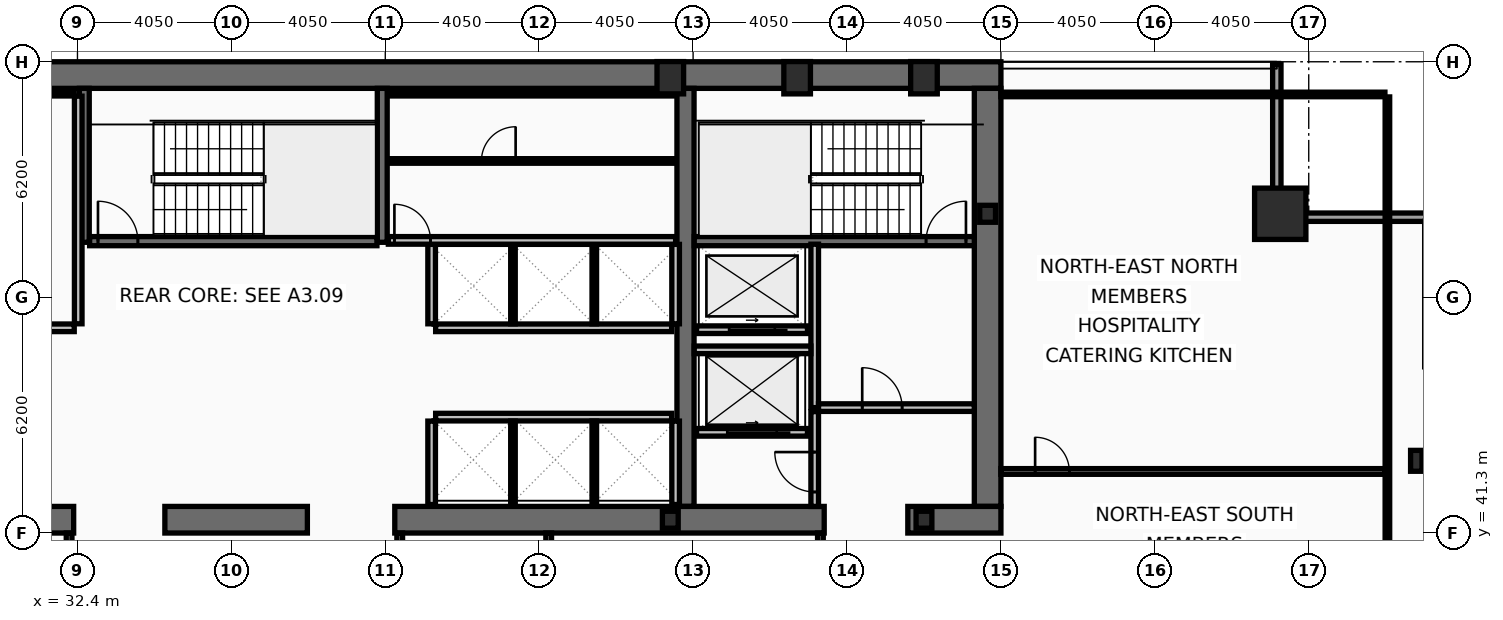
"""IFC4 building model, lengths in metres.
Left out: names, types, materials, properties, quantities, classifications, styles, units other than length and angle.
Written with IfcOpenShell. Run it as: python <this file> out.ifc"""

import sys

from ifc_helpers import new_model, si_unit, direction, frame, frame_2d, origin, origin_2d, place, context, subcontext, project, spatial, rectangle, hollow_rectangle, i_section, extrude, element, fill, save


model = new_model("IFC4")
c1 = context("Model", 3, precision=1e-05, world=origin(), true_north=direction((0.0, 1.0)))
c2 = subcontext(c1, "Body", "Model", "MODEL_VIEW")
j1 = project(units=[si_unit("LENGTHUNIT", "METRE"), si_unit("PLANEANGLEUNIT", "RADIAN")], contexts=[c1])
p1 = place(None, origin())
s1 = spatial("IfcSite", under=j1, at=p1, CompositionType="ELEMENT")
p2 = place(p1, origin())
s2 = spatial("IfcBuilding", under=s1, at=p2, CompositionType="ELEMENT")
p3 = place(p2, frame((0.0, 0.0, 150.6)))
s3 = spatial("IfcBuildingStorey", under=s2, at=p3, CompositionType="ELEMENT", Elevation=150.6)
p4 = place(p3, frame((16.2, 53.35, 0.0), z_axis=(0.0, 0.0, 1.0), x_axis=(1.0, 0.0, 0.0)))
e1 = element("IfcWall", 1, at=p4, inside=s3, PredefinedType="SHEAR", context=c2, shape_type="SweptSolid", body=[
    extrude(rectangle(XDim=40.5, YDim=0.7, at=frame_2d((20.25, 0.0))), origin(), (0.0, 0.0, 1.0), 3.44),
])
p5 = place(p3, frame((56.35, 53.0, 0.0), z_axis=(0.0, 0.0, 1.0), x_axis=(0.0, -1.0, 0.0)))
e2 = element("IfcWall", 2, at=p5, inside=s3, PredefinedType="SHEAR", context=c2, shape_type="SweptSolid", body=[
    extrude(rectangle(XDim=11.0, YDim=0.7, at=frame_2d((5.5, 0.0))), origin(), (0.0, 0.0, 1.0), 3.44),
])
p6 = place(p3, frame((48.4, 42.0, 0.0), z_axis=(0.0, 0.0, 1.0), x_axis=(0.0, 1.0, 0.0)))
e3 = element("IfcWall", 3, at=p6, inside=s3, PredefinedType="SHEAR", context=c2, shape_type="SweptSolid", body=[
    extrude(rectangle(XDim=11.0, YDim=0.45, at=frame_2d((5.5, 0.0))), origin(), (0.0, 0.0, 1.0), 3.44),
])
p7 = place(p3, frame((32.3, 41.65, 0.0), z_axis=(0.0, 0.0, 1.0), x_axis=(-1.0, 0.0, 0.0)))
e4 = element("IfcWall", 4, at=p7, inside=s3, PredefinedType="SHEAR", context=c2, shape_type="SweptSolid", body=[
    extrude(rectangle(XDim=11.45, YDim=0.7, at=frame_2d((5.725, 0.0))), origin(), (0.0, 0.0, 1.0), 3.44),
])
p8 = place(p3, frame((38.45, 41.65, 0.0), z_axis=(0.0, 0.0, 1.0), x_axis=(-1.0, 0.0, 0.0)))
e5 = element("IfcWall", 5, at=p8, inside=s3, PredefinedType="SHEAR", context=c2, shape_type="SweptSolid", body=[
    extrude(rectangle(XDim=3.75, YDim=0.7, at=frame_2d((1.875, 0.0))), origin(), (0.0, 0.0, 1.0), 3.44),
])
p9 = place(p3, frame((52.05, 41.65, 0.0), z_axis=(0.0, 0.0, 1.0), x_axis=(-1.0, 0.0, 0.0)))
e6 = element("IfcWall", 6, at=p9, inside=s3, PredefinedType="SHEAR", context=c2, shape_type="SweptSolid", body=[
    extrude(rectangle(XDim=11.3, YDim=0.7, at=frame_2d((5.65, 0.0))), origin(), (0.0, 0.0, 1.0), 3.44),
])
p10 = place(p3, frame((56.7, 41.65, 0.0), z_axis=(0.0, 0.0, 1.0), x_axis=(-1.0, 0.0, 0.0)))
e7 = element("IfcWall", 7, at=p10, inside=s3, PredefinedType="SHEAR", context=c2, shape_type="SweptSolid", body=[
    extrude(rectangle(XDim=2.45, YDim=0.7, at=frame_2d((1.225, 0.0))), origin(), (0.0, 0.0, 1.0), 3.44),
])
for number, where, z_axis, x_axis in (
    (8, (32.58, 48.95, 0.0), (0.0, 0.0, 1.0), (0.0, 1.0, 0.0)),
    (9, (40.42, 48.95, 0.0), (0.0, 0.0, 1.0), (0.0, 1.0, 0.0)),
):
    element("IfcWall", number, at=place(p3, frame(where, z_axis=z_axis, x_axis=x_axis)), inside=s3, PredefinedType="SHEAR", context=c2, shape_type="SweptSolid", body=[
        extrude(rectangle(XDim=4.05, YDim=0.26, at=frame_2d((2.025, 0.0))), origin(), (0.0, 0.0, 1.0), 3.44),
    ])
p11 = place(p3, frame((48.63, 48.98, 0.0), z_axis=(0.0, 0.0, 1.0), x_axis=(1.0, 0.0, 0.0)))
e10 = element("IfcWall", 10, at=p11, inside=s3, PredefinedType="SHEAR", context=c2, shape_type="SweptSolid", body=[
    extrude(rectangle(XDim=7.37, YDim=0.24, at=frame_2d((3.685, 0.0))), origin(), (0.0, 0.0, 1.0), 3.44),
])
p12 = place(p11, frame((6.1, 0.0, 0.0)))
e11 = element("IfcOpeningElement", 11, at=p12, cuts=e10, PredefinedType="OPENING", context=c2, shape_type="SweptSolid", body=[
    extrude(rectangle(XDim=1.05, YDim=2.15, at=frame_2d((0.525, 1.075))), frame((0.0, 0.13, 0.0), z_axis=(0.0, -1.0, 0.0), x_axis=(1.0, 0.0, 0.0)), (0.0, 0.0, 1.0), 0.26),
])
p13 = place(p3, frame((32.72, 48.98, 0.0), z_axis=(0.0, 0.0, 1.0), x_axis=(1.0, 0.0, 0.0)))
e12 = element("IfcWall", 12, at=p13, inside=s3, PredefinedType="SHEAR", context=c2, shape_type="SweptSolid", body=[
    extrude(rectangle(XDim=7.56, YDim=0.24, at=frame_2d((3.78, 0.0))), origin(), (0.0, 0.0, 1.0), 3.44),
])
p14 = place(p13, frame((0.22, 0.0, 0.0)))
e13 = element("IfcOpeningElement", 13, at=p14, cuts=e12, PredefinedType="OPENING", context=c2, shape_type="SweptSolid", body=[
    extrude(rectangle(XDim=1.05, YDim=2.15, at=frame_2d((0.525, 1.075))), frame((0.0, 0.13, 0.0), z_axis=(0.0, -1.0, 0.0), x_axis=(1.0, 0.0, 0.0)), (0.0, 0.0, 1.0), 0.26),
])
p15 = place(p3, frame((64.05, 49.7, 0.0), z_axis=(0.0, 0.0, 1.0), x_axis=(1.0, 0.0, 0.0)))
e14 = element("IfcColumn", 14, at=p15, inside=s3, PredefinedType="COLUMN", context=c2, shape_type="SweptSolid", body=[
    extrude(hollow_rectangle(XDim=1.35, YDim=1.35, WallThickness=0.065, at=origin_2d()), origin(), (0.0, 0.0, 1.0), 3.6),
])
for number, where, z_axis, x_axis in (
    (15, (48.0, 53.28, 0.0), (0.0, 0.0, 1.0), (1.0, 0.0, 0.0)),
    (16, (51.337, 53.28, 0.0), (0.0, 0.0, 1.0), (1.0, 0.0, 0.0)),
    (17, (54.675, 53.28, 0.0), (0.0, 0.0, 1.0), (1.0, 0.0, 0.0)),
):
    element("IfcColumn", number, at=place(p3, frame(where, z_axis=z_axis, x_axis=x_axis)), inside=s3, PredefinedType="COLUMN", context=c2, shape_type="SweptSolid", body=[
        extrude(hollow_rectangle(XDim=0.7, YDim=0.85, WallThickness=0.05, at=origin_2d()), origin(), (0.0, 0.0, 1.0), 3.6),
    ])
p16 = place(p3, frame((67.63, 43.2, 0.0), z_axis=(0.0, 0.0, 1.0), x_axis=(1.0, 0.0, 0.0)))
e18 = element("IfcColumn", 18, at=p16, inside=s3, PredefinedType="COLUMN", context=c2, shape_type="SweptSolid", body=[
    extrude(i_section(OverallWidth=0.3, OverallDepth=0.55, WebThickness=0.015, FlangeThickness=0.029, at=origin_2d()), origin(), (0.0, 0.0, 1.0), 3.6),
])
for number, where, z_axis, x_axis in (
    (19, (56.35, 49.7, 0.0), (0.0, 0.0, 1.0), (1.0, 0.0, 0.0)),
    (20, (48.0, 41.65, 0.0), (0.0, 0.0, 1.0), (1.0, 0.0, 0.0)),
    (21, (54.675, 41.65, 0.0), (0.0, 0.0, 1.0), (1.0, 0.0, 0.0)),
):
    element("IfcColumn", number, at=place(p3, frame(where, z_axis=z_axis, x_axis=x_axis)), inside=s3, PredefinedType="COLUMN", context=c2, shape_type="SweptSolid", body=[
        extrude(i_section(OverallWidth=0.416, OverallDepth=0.446, WebThickness=0.039, FlangeThickness=0.063, at=origin_2d()), origin(), (0.0, 0.0, 1.0), 3.6),
    ])
p17 = place(p3, frame((63.96, 53.63, 0.0), z_axis=(0.0, 0.0, 1.0), x_axis=(0.0, -1.0, 0.0)))
e22 = element("IfcWall", 22, at=p17, inside=s3, PredefinedType="SOLIDWALL", context=c2, shape_type="SweptSolid", body=[
    extrude(rectangle(XDim=3.91, YDim=0.22, at=frame_2d((1.955, 0.0))), origin(), (0.0, 0.0, 1.0), 2.83),
])
p18 = place(p3, frame((63.85, 49.61, 0.0), z_axis=(0.0, 0.0, 1.0), x_axis=(1.0, 0.0, 0.0)))
e23 = element("IfcWall", 23, at=p18, inside=s3, PredefinedType="SOLIDWALL", context=c2, shape_type="SweptSolid", body=[
    extrude(rectangle(XDim=4.22, YDim=0.22, at=frame_2d((2.11, 0.0))), origin(), (0.0, 0.0, 1.0), 2.83),
])
p19 = place(p3, frame((51.61, 43.95, 0.0), z_axis=(0.0, 0.0, 1.0), x_axis=(-1.0, 0.0, 0.0)))
e24 = element("IfcWall", 24, at=p19, inside=s3, PredefinedType="PARTITIONING", context=c2, shape_type="SweptSolid", body=[
    extrude(rectangle(XDim=2.92, YDim=0.2, at=frame_2d((1.46, 0.0))), origin(), (0.0, 0.0, 1.0), 3.44),
])
p20 = place(p19, frame((0.81, 0.0, 0.0)))
e25 = element("IfcOpeningElement", 25, at=p20, cuts=e24, PredefinedType="OPENING", context=c2, shape_type="SweptSolid", body=[
    extrude(rectangle(XDim=1.3, YDim=2.18, at=frame_2d((0.65, 1.09))), frame((0.0, 0.11, 0.0), z_axis=(0.0, -1.0, 0.0), x_axis=(1.0, 0.0, 0.0)), (0.0, 0.0, 1.0), 0.22),
])
p21 = place(p3, frame((51.61, 46.65, 0.0), z_axis=(0.0, 0.0, 1.0), x_axis=(-1.0, 0.0, 0.0)))
e26 = element("IfcWall", 26, at=p21, inside=s3, PredefinedType="PARTITIONING", context=c2, shape_type="SweptSolid", body=[
    extrude(rectangle(XDim=2.92, YDim=0.2, at=frame_2d((1.46, 0.0))), origin(), (0.0, 0.0, 1.0), 3.44),
])
p22 = place(p21, frame((0.86, 0.0, 0.0)))
e27 = element("IfcOpeningElement", 27, at=p22, cuts=e26, PredefinedType="OPENING", context=c2, shape_type="SweptSolid", body=[
    extrude(rectangle(XDim=1.2, YDim=2.18, at=frame_2d((0.6, 1.09))), frame((0.0, 0.11, 0.0), z_axis=(0.0, -1.0, 0.0), x_axis=(1.0, 0.0, 0.0)), (0.0, 0.0, 1.0), 0.22),
])
p23 = place(p3, frame((51.8, 44.6, 0.0), z_axis=(0.0, 0.0, 1.0), x_axis=(0.0, 1.0, 0.0)))
e28 = element("IfcWall", 28, at=p23, inside=s3, PredefinedType="PARTITIONING", context=c2, shape_type="SweptSolid", body=[
    extrude(rectangle(XDim=4.3, YDim=0.2, at=frame_2d((2.15, 0.0))), origin(), (0.0, 0.0, 1.0), 3.44),
])
p24 = place(p3, frame((51.9, 44.6, 0.0), z_axis=(0.0, 0.0, 1.0), x_axis=(1.0, 0.0, 0.0)))
e29 = element("IfcWall", 29, at=p24, inside=s3, PredefinedType="PARTITIONING", context=c2, shape_type="SweptSolid", body=[
    extrude(rectangle(XDim=4.1, YDim=0.2, at=frame_2d((2.05, 0.0))), origin(), (0.0, 0.0, 1.0), 3.44),
])
p25 = place(p24, frame((1.15, 0.0, 0.0)))
e30 = element("IfcOpeningElement", 30, at=p25, cuts=e29, PredefinedType="OPENING", context=c2, shape_type="SweptSolid", body=[
    extrude(rectangle(XDim=1.05, YDim=2.15, at=frame_2d((0.525, 1.075))), frame((0.0, 0.11, 0.0), z_axis=(0.0, -1.0, 0.0), x_axis=(1.0, 0.0, 0.0)), (0.0, 0.0, 1.0), 0.22),
])
p26 = place(p3, frame((48.63, 46.12, 0.0), z_axis=(0.0, 0.0, 1.0), x_axis=(1.0, 0.0, 0.0)))
e31 = element("IfcWall", 31, at=p26, inside=s3, PredefinedType="PARTITIONING", context=c2, shape_type="SweptSolid", body=[
    extrude(rectangle(XDim=3.07, YDim=0.2, at=frame_2d((1.535, 0.0))), origin(), (0.0, 0.0, 1.0), 3.44),
])
p27 = place(p3, frame((51.8, 42.0, 0.0), z_axis=(0.0, 0.0, 1.0), x_axis=(0.0, 1.0, 0.0)))
e32 = element("IfcWall", 32, at=p27, inside=s3, PredefinedType="PARTITIONING", context=c2, shape_type="SweptSolid", body=[
    extrude(rectangle(XDim=2.495, YDim=0.2, at=frame_2d((1.248, 0.0))), origin(), (0.0, 0.0, 1.0), 3.44),
])
p28 = place(p27, frame((0.38, 0.0, 0.0)))
e33 = element("IfcOpeningElement", 33, at=p28, cuts=e32, PredefinedType="OPENING", context=c2, shape_type="SweptSolid", body=[
    extrude(rectangle(XDim=1.05, YDim=2.15, at=frame_2d((0.525, 1.075))), frame((0.0, 0.11, 0.0), z_axis=(0.0, -1.0, 0.0), x_axis=(1.0, 0.0, 0.0)), (0.0, 0.0, 1.0), 0.22),
])
p29 = place(p3, frame((32.42, 46.805, 0.0), z_axis=(0.0, 0.0, 1.0), x_axis=(0.0, 1.0, 0.0)))
e34 = element("IfcWall", 34, at=p29, inside=s3, PredefinedType="PARTITIONING", context=c2, shape_type="SweptSolid", body=[
    extrude(rectangle(XDim=5.99, YDim=0.2, at=frame_2d((2.995, 0.0))), origin(), (0.0, 0.0, 1.0), 3.44),
])
p30 = place(p3, frame((24.805, 52.86, 0.0), z_axis=(0.0, 0.0, 1.0), x_axis=(1.0, 0.0, 0.0)))
e35 = element("IfcWall", 35, at=p30, inside=s3, PredefinedType="PARTITIONING", context=c2, shape_type="SweptSolid", body=[
    extrude(rectangle(XDim=7.51, YDim=0.12, at=frame_2d((3.755, 0.0))), origin(), (0.0, 0.0, 1.0), 3.44),
])
p31 = place(p3, frame((24.805, 46.7, 0.0), z_axis=(0.0, 0.0, 1.0), x_axis=(1.0, 0.0, 0.0)))
e36 = element("IfcWall", 36, at=p31, inside=s3, PredefinedType="PARTITIONING", context=c2, shape_type="SweptSolid", body=[
    extrude(rectangle(XDim=7.51, YDim=0.2, at=frame_2d((3.755, 0.0))), origin(), (0.0, 0.0, 1.0), 3.44),
])
p32 = place(p31, frame((1.15, 0.0, 0.0)))
e37 = element("IfcOpeningElement", 37, at=p32, cuts=e36, PredefinedType="OPENING", context=c2, shape_type="SweptSolid", body=[
    extrude(rectangle(XDim=0.95, YDim=2.1, at=frame_2d((0.475, 1.05))), frame((0.0, 0.11, 0.0), z_axis=(0.0, -1.0, 0.0), x_axis=(1.0, 0.0, 0.0)), (0.0, 0.0, 1.0), 0.22),
])
p33 = place(p31, frame((5.336, 0.0, 0.0)))
e38 = element("IfcOpeningElement", 38, at=p33, cuts=e36, PredefinedType="OPENING", context=c2, shape_type="SweptSolid", body=[
    extrude(rectangle(XDim=0.95, YDim=2.1, at=frame_2d((0.475, 1.05))), frame((0.0, 0.11, 0.0), z_axis=(0.0, -1.0, 0.0), x_axis=(1.0, 0.0, 0.0)), (0.0, 0.0, 1.0), 0.22),
])
p34 = place(p3, frame((41.825, 46.7, 0.0), z_axis=(0.0, 0.0, 1.0), x_axis=(1.0, 0.0, 0.0)))
e39 = element("IfcWall", 39, at=p34, inside=s3, PredefinedType="PARTITIONING", context=c2, shape_type="SweptSolid", body=[
    extrude(rectangle(XDim=6.21, YDim=0.2, at=frame_2d((3.105, 0.0))), origin(), (0.0, 0.0, 1.0), 3.44),
])
for number, where, z_axis, x_axis in (
    (40, (41.72, 46.805, 0.0), (0.0, 0.0, 1.0), (0.0, 1.0, 0.0)),
    (41, (48.14, 46.805, 0.0), (0.0, 0.0, 1.0), (0.0, 1.0, 0.0)),
):
    element("IfcWall", number, at=place(p3, frame(where, z_axis=z_axis, x_axis=x_axis)), inside=s3, PredefinedType="PARTITIONING", context=c2, shape_type="SweptSolid", body=[
        extrude(rectangle(XDim=2.09, YDim=0.2, at=frame_2d((1.045, 0.0))), origin(), (0.0, 0.0, 1.0), 3.44),
    ])
for number, where, z_axis, x_axis in (
    (42, (43.86, 46.805, 0.0), (0.0, 0.0, 1.0), (0.0, 1.0, 0.0)),
    (43, (46.0, 46.805, 0.0), (0.0, 0.0, 1.0), (0.0, 1.0, 0.0)),
):
    element("IfcWall", number, at=place(p3, frame(where, z_axis=z_axis, x_axis=x_axis)), inside=s3, PredefinedType="PARTITIONING", context=c2, shape_type="SweptSolid", body=[
        extrude(rectangle(XDim=2.09, YDim=0.12, at=frame_2d((1.045, 0.0))), origin(), (0.0, 0.0, 1.0), 3.44),
    ])
p35 = place(p3, frame((41.825, 44.35, 0.0), z_axis=(0.0, 0.0, 1.0), x_axis=(1.0, 0.0, 0.0)))
e44 = element("IfcWall", 44, at=p35, inside=s3, PredefinedType="PARTITIONING", context=c2, shape_type="SweptSolid", body=[
    extrude(rectangle(XDim=6.21, YDim=0.2, at=frame_2d((3.105, 0.0))), origin(), (0.0, 0.0, 1.0), 3.44),
])
for number, where, z_axis, x_axis in (
    (45, (41.72, 42.05, 0.0), (0.0, 0.0, 1.0), (0.0, 1.0, 0.0)),
    (46, (48.14, 42.05, 0.0), (0.0, 0.0, 1.0), (0.0, 1.0, 0.0)),
):
    element("IfcWall", number, at=place(p3, frame(where, z_axis=z_axis, x_axis=x_axis)), inside=s3, PredefinedType="PARTITIONING", context=c2, shape_type="SweptSolid", body=[
        extrude(rectangle(XDim=2.195, YDim=0.2, at=frame_2d((1.098, 0.0))), origin(), (0.0, 0.0, 1.0), 3.44),
    ])
for number, where, z_axis, x_axis in (
    (47, (43.86, 42.05, 0.0), (0.0, 0.0, 1.0), (0.0, 1.0, 0.0)),
    (48, (46.0, 42.05, 0.0), (0.0, 0.0, 1.0), (0.0, 1.0, 0.0)),
):
    element("IfcWall", number, at=place(p3, frame(where, z_axis=z_axis, x_axis=x_axis)), inside=s3, PredefinedType="PARTITIONING", context=c2, shape_type="SweptSolid", body=[
        extrude(rectangle(XDim=2.195, YDim=0.12, at=frame_2d((1.098, 0.0))), origin(), (0.0, 0.0, 1.0), 3.44),
    ])
p36 = place(p3, frame((40.58, 52.86, 0.0), z_axis=(0.0, 0.0, 1.0), x_axis=(1.0, 0.0, 0.0)))
e49 = element("IfcWall", 49, at=p36, inside=s3, PredefinedType="PARTITIONING", context=c2, shape_type="SweptSolid", body=[
    extrude(rectangle(XDim=7.56, YDim=0.12, at=frame_2d((3.78, 0.0))), origin(), (0.0, 0.0, 1.0), 3.44),
])
p37 = place(p3, frame((40.58, 49.0, 0.0), z_axis=(0.0, 0.0, 1.0), x_axis=(1.0, 0.0, 0.0)))
e50 = element("IfcWall", 50, at=p37, inside=s3, PredefinedType="PARTITIONING", context=c2, shape_type="SweptSolid", body=[
    extrude(rectangle(XDim=7.56, YDim=0.2, at=frame_2d((3.78, 0.0))), origin(), (0.0, 0.0, 1.0), 3.44),
])
p38 = place(p37, frame((0.16, 0.0, 0.0)))
e51 = element("IfcOpeningElement", 51, at=p38, cuts=e50, PredefinedType="OPENING", context=c2, shape_type="SweptSolid", body=[
    extrude(rectangle(XDim=0.95, YDim=2.1, at=frame_2d((0.475, 1.05))), frame((0.0, 0.11, 0.0), z_axis=(0.0, -1.0, 0.0), x_axis=(1.0, 0.0, 0.0)), (0.0, 0.0, 1.0), 0.22),
])
p39 = place(p3, frame((40.63, 51.09, 0.0), z_axis=(0.0, 0.0, 1.0), x_axis=(1.0, 0.0, 0.0)))
e52 = element("IfcWall", 52, at=p39, inside=s3, PredefinedType="PARTITIONING", context=c2, shape_type="SweptSolid", body=[
    extrude(rectangle(XDim=7.46, YDim=0.12, at=frame_2d((3.73, 0.0))), origin(), (0.0, 0.0, 1.0), 3.44),
])
p40 = place(p39, frame((2.4, 0.0, 0.0)))
e53 = element("IfcOpeningElement", 53, at=p40, cuts=e52, PredefinedType="OPENING", context=c2, shape_type="SweptSolid", body=[
    extrude(rectangle(XDim=0.9, YDim=2.05, at=frame_2d((0.45, 1.025))), frame((0.0, 0.07, 0.0), z_axis=(0.0, -1.0, 0.0), x_axis=(1.0, 0.0, 0.0)), (0.0, 0.0, 1.0), 0.14),
])
for number, where, z_axis, x_axis in (
    (54, (32.18, 38.28, 0.0), (0.0, 0.0, 1.0), (0.0, 1.0, 0.0)),
    (55, (40.88, 38.28, 0.0), (0.0, 0.0, 1.0), (0.0, 1.0, 0.0)),
    (56, (44.8, 38.28, 0.0), (0.0, 0.0, 1.0), (0.0, 1.0, 0.0)),
    (57, (51.95, 38.28, 0.0), (0.0, 0.0, 1.0), (0.0, 1.0, 0.0)),
):
    element("IfcWall", number, at=place(p3, frame(where, z_axis=z_axis, x_axis=x_axis)), inside=s3, PredefinedType="PARTITIONING", context=c2, shape_type="SweptSolid", body=[
        extrude(rectangle(XDim=3.02, YDim=0.15, at=frame_2d((1.51, 0.0))), origin(), (0.0, 0.0, 1.0), 3.44),
    ])
p41 = place(p3, frame((56.7, 42.92, 0.0), z_axis=(0.0, 0.0, 1.0), x_axis=(1.0, 0.0, 0.0)))
e58 = element("IfcWall", 58, at=p41, inside=s3, PredefinedType="PARTITIONING", context=c2, shape_type="SweptSolid", body=[
    extrude(rectangle(XDim=10.105, YDim=0.15, at=frame_2d((5.052, 0.0))), origin(), (0.0, 0.0, 1.0), 2.73),
])
p42 = place(p41, frame((0.9, 0.0, 0.0)))
e59 = element("IfcOpeningElement", 59, at=p42, cuts=e58, PredefinedType="OPENING", context=c2, shape_type="SweptSolid", body=[
    extrude(rectangle(XDim=0.9, YDim=2.05, at=frame_2d((0.45, 1.025))), frame((0.0, 0.085, 0.0), z_axis=(0.0, -1.0, 0.0), x_axis=(1.0, 0.0, 0.0)), (0.0, 0.0, 1.0), 0.17),
])
p43 = place(p3, frame((66.87, 10.665, 0.0), z_axis=(0.0, 0.0, 1.0), x_axis=(0.0, 1.0, 0.0)))
e60 = element("IfcWall", 60, at=p43, inside=s3, PredefinedType="PARTITIONING", context=c2, shape_type="SweptSolid", body=[
    extrude(rectangle(XDim=42.11, YDim=0.12, at=frame_2d((21.055, 0.0))), origin(), (0.0, 0.0, 1.0), 2.73),
])
p44 = place(p3, frame((56.7, 52.84, 0.0), z_axis=(0.0, 0.0, 1.0), x_axis=(1.0, 0.0, 0.0)))
e61 = element("IfcWall", 61, at=p44, inside=s3, PredefinedType="PARTITIONING", context=c2, shape_type="SweptSolid", body=[
    extrude(rectangle(XDim=10.105, YDim=0.12, at=frame_2d((5.052, 0.0))), origin(), (0.0, 0.0, 1.0), 3.44),
])
p45 = place(p12, origin())
e62 = element("IfcDoor", 62, at=p45, inside=s3, OperationType="SINGLE_SWING_RIGHT", PredefinedType="DOOR", context=c2, shape_type="SweptSolid", body=[
    extrude(rectangle(XDim=1.05, YDim=2.15, at=frame_2d((0.525, 1.075))), frame((0.0, 0.025, 0.0), z_axis=(0.0, -1.0, 0.0), x_axis=(1.0, 0.0, 0.0)), (0.0, 0.0, 1.0), 0.05),
])
fill(e11, e62)
p46 = place(p14, origin())
e63 = element("IfcDoor", 63, at=p46, inside=s3, OperationType="SINGLE_SWING_LEFT", PredefinedType="DOOR", context=c2, shape_type="SweptSolid", body=[
    extrude(rectangle(XDim=1.05, YDim=2.15, at=frame_2d((0.525, 1.075))), frame((0.0, 0.025, 0.0), z_axis=(0.0, -1.0, 0.0), x_axis=(1.0, 0.0, 0.0)), (0.0, 0.0, 1.0), 0.05),
])
fill(e13, e63)
p47 = place(p20, origin())
e64 = element("IfcDoor", 64, at=p47, inside=s3, OperationType="SLIDING_TO_LEFT", PredefinedType="DOOR", context=c2, shape_type="SweptSolid", body=[
    extrude(rectangle(XDim=1.3, YDim=2.18, at=frame_2d((0.65, 1.09))), frame((0.0, 0.025, 0.0), z_axis=(0.0, -1.0, 0.0), x_axis=(1.0, 0.0, 0.0)), (0.0, 0.0, 1.0), 0.05),
])
fill(e25, e64)
p48 = place(p22, origin())
e65 = element("IfcDoor", 65, at=p48, inside=s3, OperationType="SLIDING_TO_LEFT", PredefinedType="DOOR", context=c2, shape_type="SweptSolid", body=[
    extrude(rectangle(XDim=1.2, YDim=2.18, at=frame_2d((0.6, 1.09))), frame((0.0, 0.025, 0.0), z_axis=(0.0, -1.0, 0.0), x_axis=(1.0, 0.0, 0.0)), (0.0, 0.0, 1.0), 0.05),
])
fill(e27, e65)
p49 = place(p25, origin())
e66 = element("IfcDoor", 66, at=p49, inside=s3, OperationType="SINGLE_SWING_LEFT", PredefinedType="DOOR", context=c2, shape_type="SweptSolid", body=[
    extrude(rectangle(XDim=1.05, YDim=2.15, at=frame_2d((0.525, 1.075))), frame((0.0, 0.025, 0.0), z_axis=(0.0, -1.0, 0.0), x_axis=(1.0, 0.0, 0.0)), (0.0, 0.0, 1.0), 0.05),
])
fill(e30, e66)
p50 = place(p28, origin())
e67 = element("IfcDoor", 67, at=p50, inside=s3, OperationType="SINGLE_SWING_RIGHT", PredefinedType="DOOR", context=c2, shape_type="SweptSolid", body=[
    extrude(rectangle(XDim=1.05, YDim=2.15, at=frame_2d((0.525, 1.075))), frame((0.0, 0.025, 0.0), z_axis=(0.0, -1.0, 0.0), x_axis=(1.0, 0.0, 0.0)), (0.0, 0.0, 1.0), 0.05),
])
fill(e33, e67)
p51 = place(p38, origin())
e68 = element("IfcDoor", 68, at=p51, inside=s3, OperationType="SINGLE_SWING_LEFT", PredefinedType="DOOR", context=c2, shape_type="SweptSolid", body=[
    extrude(rectangle(XDim=0.95, YDim=2.1, at=frame_2d((0.475, 1.05))), frame((0.0, 0.025, 0.0), z_axis=(0.0, -1.0, 0.0), x_axis=(1.0, 0.0, 0.0)), (0.0, 0.0, 1.0), 0.05),
])
fill(e51, e68)
p52 = place(p40, origin())
e69 = element("IfcDoor", 69, at=p52, inside=s3, OperationType="SINGLE_SWING_RIGHT", PredefinedType="DOOR", context=c2, shape_type="SweptSolid", body=[
    extrude(rectangle(XDim=0.9, YDim=2.05, at=frame_2d((0.45, 1.025))), frame((0.0, 0.025, 0.0), z_axis=(0.0, -1.0, 0.0), x_axis=(1.0, 0.0, 0.0)), (0.0, 0.0, 1.0), 0.05),
])
fill(e53, e69)
p53 = place(p42, origin())
e70 = element("IfcDoor", 70, at=p53, inside=s3, OperationType="SINGLE_SWING_LEFT", PredefinedType="DOOR", context=c2, shape_type="SweptSolid", body=[
    extrude(rectangle(XDim=0.9, YDim=2.05, at=frame_2d((0.45, 1.025))), frame((0.0, 0.025, 0.0), z_axis=(0.0, -1.0, 0.0), x_axis=(1.0, 0.0, 0.0)), (0.0, 0.0, 1.0), 0.05),
])
fill(e59, e70)
save(model, sys.argv[1])
